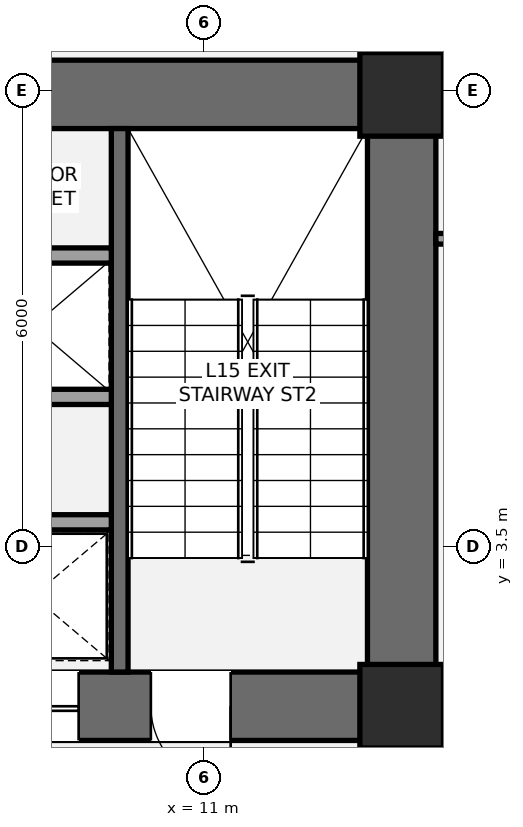
"""IFC4 building model, lengths in metres.
Left out: names, types, materials, properties, quantities, classifications, styles, units other than length and angle.
Written with IfcOpenShell. Run it as: python <this file> out.ifc"""

import sys

from ifc_helpers import new_model, si_unit, direction, frame, frame_2d, origin, origin_2d, place, context, subcontext, project, spatial, rectangle, extrude, element, fill, save


model = new_model("IFC4")
c1 = context("Model", 3, precision=1e-05, world=origin(), true_north=direction((0.0, 1.0)))
c2 = subcontext(c1, "Body", "Model", "MODEL_VIEW")
j1 = project(units=[si_unit("LENGTHUNIT", "METRE"), si_unit("PLANEANGLEUNIT", "RADIAN")], contexts=[c1])
p1 = place(None, origin())
s1 = spatial("IfcSite", under=j1, at=p1, CompositionType="ELEMENT")
p2 = place(p1, origin())
s2 = spatial("IfcBuilding", under=s1, at=p2, CompositionType="ELEMENT")
p3 = place(p2, frame((0.0, 0.0, 59.4)))
s3 = spatial("IfcBuildingStorey", under=s2, at=p3, CompositionType="ELEMENT", Elevation=59.4)
p4 = place(p3, frame((13.6, 0.95, 0.0), z_axis=(0.0, 0.0, 1.0), x_axis=(0.0, 1.0, 0.0)))
e1 = element("IfcWall", 1, at=p4, inside=s3, PredefinedType="SHEAR", context=c2, shape_type="SweptSolid", body=[
    extrude(rectangle(XDim=8.95, YDim=0.9, at=frame_2d((4.475, 0.0))), origin(), (0.0, 0.0, 1.0), 3.6),
])
p5 = place(p3, frame((4.35, 9.45, 0.0), z_axis=(0.0, 0.0, 1.0), x_axis=(1.0, 0.0, 0.0)))
e2 = element("IfcWall", 2, at=p5, inside=s3, PredefinedType="SHEAR", context=c2, shape_type="SweptSolid", body=[
    extrude(rectangle(XDim=9.7, YDim=0.9, at=frame_2d((4.85, 0.0))), origin(), (0.0, 0.0, 1.0), 3.6),
])
p6 = place(p3, frame((14.05, 1.4, 0.0), z_axis=(0.0, 0.0, 1.0), x_axis=(-1.0, 0.0, 0.0)))
e3 = element("IfcWall", 3, at=p6, inside=s3, PredefinedType="SHEAR", context=c2, shape_type="SweptSolid", body=[
    extrude(rectangle(XDim=9.3, YDim=0.9, at=frame_2d((4.65, 0.0))), origin(), (0.0, 0.0, 1.0), 3.6),
])
p7 = place(p6, frame((2.7, 0.0, 0.0)))
e4 = element("IfcOpeningElement", 4, at=p7, cuts=e3, PredefinedType="OPENING", context=c2, shape_type="SweptSolid", body=[
    extrude(rectangle(XDim=1.05, YDim=2.15, at=frame_2d((0.525, 1.075))), frame((0.0, 0.46, 0.0), z_axis=(0.0, -1.0, 0.0), x_axis=(1.0, 0.0, 0.0)), (0.0, 0.0, 1.0), 0.92),
])
p8 = place(p6, frame((4.7, 0.0, 0.0)))
e5 = element("IfcOpeningElement", 5, at=p8, cuts=e3, PredefinedType="OPENING", context=c2, shape_type="SweptSolid", body=[
    extrude(rectangle(XDim=1.1, YDim=2.2, at=frame_2d((0.55, 1.1))), frame((0.0, 0.46, 0.0), z_axis=(0.0, -1.0, 0.0), x_axis=(1.0, 0.0, 0.0)), (0.0, 0.0, 1.0), 0.92),
])
p9 = place(p3, frame((9.89, 1.85, 0.0), z_axis=(0.0, 0.0, 1.0), x_axis=(0.0, 1.0, 0.0)))
e6 = element("IfcWall", 6, at=p9, inside=s3, PredefinedType="SHEAR", context=c2, shape_type="SweptSolid", body=[
    extrude(rectangle(XDim=7.15, YDim=0.22, at=frame_2d((3.575, 0.0))), origin(), (0.0, 0.0, 1.0), 3.6),
])
for number, where, z_axis, x_axis in (
    (7, (13.6, 1.4, 0.0), (0.0, 0.0, 1.0), (1.0, 0.0, 0.0)),
    (8, (13.6, 9.45, 0.0), (0.0, 0.0, 1.0), (1.0, 0.0, 0.0)),
):
    element("IfcColumn", number, at=place(p3, frame(where, z_axis=z_axis, x_axis=x_axis)), inside=s3, PredefinedType="COLUMN", context=c2, shape_type="SweptSolid", body=[
        extrude(rectangle(XDim=1.1, YDim=1.1, at=origin_2d()), origin(), (0.0, 0.0, 1.0), 3.6),
    ])
p10 = place(p3, frame((13.45, -2.15, 0.0), z_axis=(0.0, 0.0, 1.0), x_axis=(0.0, 1.0, 0.0)))
e9 = element("IfcWall", 9, at=p10, inside=s3, PredefinedType="PARTITIONING", context=c2, shape_type="SweptSolid", body=[
    extrude(rectangle(XDim=3.15, YDim=0.165, at=frame_2d((1.575, 0.0))), origin(), (0.0, 0.0, 1.0), 2.853),
])
p11 = place(p10, frame((1.15, 0.0, 0.0)))
e10 = element("IfcOpeningElement", 10, at=p11, cuts=e9, PredefinedType="OPENING", context=c2, shape_type="SweptSolid", body=[
    extrude(rectangle(XDim=1.05, YDim=2.15, at=frame_2d((0.525, 1.075))), frame((0.0, 0.093, 0.0), z_axis=(0.0, -1.0, 0.0), x_axis=(1.0, 0.0, 0.0)), (0.0, 0.0, 1.0), 0.185),
])
p12 = place(p3, frame((5.65, 3.82, 0.0), z_axis=(0.0, 0.0, 1.0), x_axis=(1.0, 0.0, 0.0)))
e11 = element("IfcWall", 11, at=p12, inside=s3, PredefinedType="SOLIDWALL", context=c2, shape_type="SweptSolid", body=[
    extrude(rectangle(XDim=4.13, YDim=0.2, at=frame_2d((2.065, 0.0))), origin(), (0.0, 0.0, 1.0), 3.4),
])
p13 = place(p12, frame((0.65, 0.0, 0.0)))
e12 = element("IfcOpeningElement", 12, at=p13, cuts=e11, PredefinedType="OPENING", context=c2, shape_type="SweptSolid", body=[
    extrude(rectangle(XDim=1.2, YDim=2.2, at=frame_2d((0.6, 1.1))), frame((0.0, 0.11, 0.0), z_axis=(0.0, -1.0, 0.0), x_axis=(1.0, 0.0, 0.0)), (0.0, 0.0, 1.0), 0.22),
])
for number, where, z_axis, x_axis in (
    (13, (5.65, 5.47, 0.0), (0.0, 0.0, 1.0), (1.0, 0.0, 0.0)),
    (14, (5.65, 7.33, 0.0), (0.0, 0.0, 1.0), (1.0, 0.0, 0.0)),
):
    element("IfcWall", number, at=place(p3, frame(where, z_axis=z_axis, x_axis=x_axis)), inside=s3, PredefinedType="SOLIDWALL", context=c2, shape_type="SweptSolid", body=[
        extrude(rectangle(XDim=4.13, YDim=0.2, at=frame_2d((2.065, 0.0))), origin(), (0.0, 0.0, 1.0), 3.4),
    ])
p14 = place(p3, frame((14.05, 7.55, 0.0), z_axis=(0.0, 0.0, 1.0), x_axis=(1.0, 0.0, 0.0)))
e15 = element("IfcWall", 15, at=p14, inside=s3, PredefinedType="PARTITIONING", context=c2, shape_type="SweptSolid", body=[
    extrude(rectangle(XDim=11.839, YDim=0.14, at=frame_2d((5.92, 0.0))), origin(), (0.0, 0.0, 1.0), 2.853),
])
p15 = place(p14, frame((1.2, 0.0, 0.0)))
e16 = element("IfcOpeningElement", 16, at=p15, cuts=e15, PredefinedType="OPENING", context=c2, shape_type="SweptSolid", body=[
    extrude(rectangle(XDim=0.92, YDim=2.15, at=frame_2d((0.46, 1.075))), frame((0.0, 0.08, 0.0), z_axis=(0.0, -1.0, 0.0), x_axis=(1.0, 0.0, 0.0)), (0.0, 0.0, 1.0), 0.16),
])
p16 = place(p7, origin())
e17 = element("IfcDoor", 17, at=p16, inside=s3, OperationType="SINGLE_SWING_LEFT", PredefinedType="DOOR", context=c2, shape_type="SweptSolid", body=[
    extrude(rectangle(XDim=1.05, YDim=2.15, at=frame_2d((0.525, 1.075))), frame((0.0, 0.025, 0.0), z_axis=(0.0, -1.0, 0.0), x_axis=(1.0, 0.0, 0.0)), (0.0, 0.0, 1.0), 0.05),
])
fill(e4, e17)
p17 = place(p8, origin())
e18 = element("IfcDoor", 18, at=p17, inside=s3, OperationType="SLIDING_TO_LEFT", PredefinedType="DOOR", context=c2, shape_type="SweptSolid", body=[
    extrude(rectangle(XDim=1.1, YDim=2.2, at=frame_2d((0.55, 1.1))), frame((0.0, 0.025, 0.0), z_axis=(0.0, -1.0, 0.0), x_axis=(1.0, 0.0, 0.0)), (0.0, 0.0, 1.0), 0.05),
])
fill(e5, e18)
save(model, sys.argv[1])
